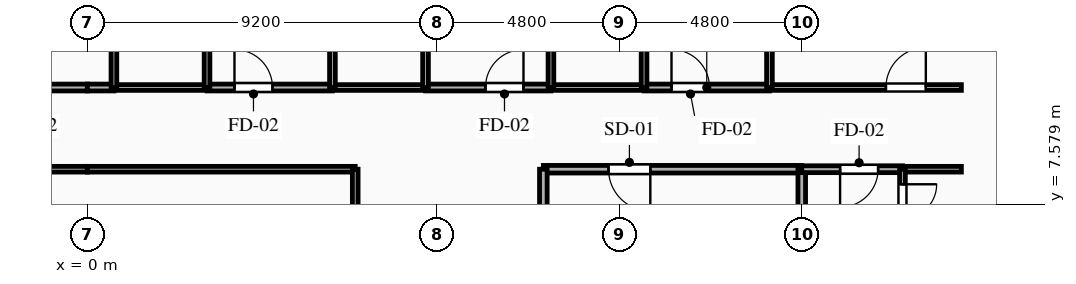
"""IFC4 building model, lengths in metres.
Left out: names, types, materials, properties, quantities, classifications, styles, units other than length and angle.
Written with IfcOpenShell. Run it as: python <this file> out.ifc"""

import sys

from ifc_helpers import new_model, si_unit, direction, frame, frame_2d, origin, place, context, subcontext, project, spatial, rectangle, extrude, element, fill, save


model = new_model("IFC4")
c1 = context("Model", 3, precision=1e-05, world=origin(), true_north=direction((0.0, 1.0)))
c2 = subcontext(c1, "Body", "Model", "MODEL_VIEW")
j1 = project(units=[si_unit("LENGTHUNIT", "METRE"), si_unit("PLANEANGLEUNIT", "RADIAN")], contexts=[c1])
p1 = place(None, origin())
s1 = spatial("IfcSite", under=j1, at=p1, CompositionType="ELEMENT")
p2 = place(p1, origin())
s2 = spatial("IfcBuilding", under=s1, at=p2, CompositionType="ELEMENT")
p3 = place(p2, frame((0.0, 0.0, 57.15)))
s3 = spatial("IfcBuildingStorey", under=s2, at=p3, CompositionType="ELEMENT", Elevation=57.15)
p4 = place(p3, frame((18.8, 8.5, 0.0), z_axis=(0.0, 0.0, 1.0), x_axis=(-1.0, 0.0, 0.0)))
e1 = element("IfcWall", 1, at=p4, inside=s3, PredefinedType="PARTITIONING", context=c2, shape_type="SweptSolid", body=[
    extrude(rectangle(XDim=6.8, YDim=0.2, at=frame_2d((3.4, 0.0))), origin(), (0.0, 0.0, 1.0), 3.035),
])
p5 = place(p4, frame((3.985, 0.0, 0.0)))
e2 = element("IfcOpeningElement", 2, at=p5, cuts=e1, PredefinedType="OPENING", context=c2, shape_type="SweptSolid", body=[
    extrude(rectangle(XDim=1.1, YDim=2.15, at=frame_2d((0.55, 1.075))), frame((0.0, 0.11, 0.0), z_axis=(0.0, -1.0, 0.0), x_axis=(1.0, 0.0, 0.0)), (0.0, 0.0, 1.0), 0.22),
])
p6 = place(p3, frame((12.0, 8.5, 0.0), z_axis=(0.0, 0.0, 1.0), x_axis=(0.0, -1.0, 0.0)))
e3 = element("IfcWall", 3, at=p6, inside=s3, PredefinedType="PARTITIONING", context=c2, shape_type="SweptSolid", body=[
    extrude(rectangle(XDim=2.9, YDim=0.2, at=frame_2d((1.45, 0.0))), origin(), (0.0, 0.0, 1.0), 3.035),
])
p7 = place(p3, frame((18.8, 5.6, 0.0), z_axis=(0.0, 0.0, 1.0), x_axis=(0.0, 1.0, 0.0)))
e4 = element("IfcWall", 4, at=p7, inside=s3, PredefinedType="PARTITIONING", context=c2, shape_type="SweptSolid", body=[
    extrude(rectangle(XDim=2.9, YDim=0.2, at=frame_2d((1.45, 0.0))), origin(), (0.0, 0.0, 1.0), 2.52),
])
p8 = place(p3, frame((-2.6, 10.65, 0.0), z_axis=(0.0, 0.0, 1.0), x_axis=(1.0, 0.0, 0.0)))
e5 = element("IfcWall", 5, at=p8, inside=s3, PredefinedType="PARTITIONING", context=c2, shape_type="SweptSolid", body=[
    extrude(rectangle(XDim=2.6, YDim=0.18, at=frame_2d((1.3, 0.0))), origin(), (0.0, 0.0, 1.0), 3.035),
])
p9 = place(p8, frame((0.635, 0.0, 0.0)))
e6 = element("IfcOpeningElement", 6, at=p9, cuts=e5, PredefinedType="OPENING", context=c2, shape_type="SweptSolid", body=[
    extrude(rectangle(XDim=1.0, YDim=2.15, at=frame_2d((0.5, 1.075))), frame((0.0, 0.1, 0.0), z_axis=(0.0, -1.0, 0.0), x_axis=(1.0, 0.0, 0.0)), (0.0, 0.0, 1.0), 0.2),
])
p10 = place(p3, frame((0.0, 8.5, 0.0), z_axis=(0.0, 0.0, 1.0), x_axis=(-1.0, 0.0, 0.0)))
e7 = element("IfcWall", 7, at=p10, inside=s3, PredefinedType="PARTITIONING", context=c2, shape_type="SweptSolid", body=[
    extrude(rectangle(XDim=7.05, YDim=0.15, at=frame_2d((3.525, 0.0))), origin(), (0.0, 0.0, 1.0), 3.035),
])
p11 = place(p10, frame((1.185, 0.0, 0.0)))
e8 = element("IfcOpeningElement", 8, at=p11, cuts=e7, PredefinedType="OPENING", context=c2, shape_type="SweptSolid", body=[
    extrude(rectangle(XDim=1.05, YDim=2.15, at=frame_2d((0.525, 1.075))), frame((0.0, 0.085, 0.0), z_axis=(0.0, -1.0, 0.0), x_axis=(1.0, 0.0, 0.0)), (0.0, 0.0, 1.0), 0.17),
])
p12 = place(p3, frame((21.45, 8.5, 0.0), z_axis=(0.0, 0.0, 1.0), x_axis=(-1.0, 0.0, 0.0)))
e9 = element("IfcWall", 9, at=p12, inside=s3, PredefinedType="PARTITIONING", context=c2, shape_type="SweptSolid", body=[
    extrude(rectangle(XDim=2.65, YDim=0.18, at=frame_2d((1.325, 0.0))), origin(), (0.0, 0.0, 1.0), 3.035),
])
p13 = place(p12, frame((0.641, 0.0, 0.0)))
e10 = element("IfcOpeningElement", 10, at=p13, cuts=e9, PredefinedType="OPENING", context=c2, shape_type="SweptSolid", body=[
    extrude(rectangle(XDim=1.0, YDim=2.15, at=frame_2d((0.5, 1.075))), frame((0.0, 0.1, 0.0), z_axis=(0.0, -1.0, 0.0), x_axis=(1.0, 0.0, 0.0)), (0.0, 0.0, 1.0), 0.2),
])
p14 = place(p3, frame((23.0, 8.5, 0.0), z_axis=(0.0, 0.0, 1.0), x_axis=(-1.0, 0.0, 0.0)))
e11 = element("IfcWall", 11, at=p14, inside=s3, PredefinedType="PARTITIONING", context=c2, shape_type="SweptSolid", body=[
    extrude(rectangle(XDim=1.55, YDim=0.15, at=frame_2d((0.775, 0.0))), origin(), (0.0, 0.0, 1.0), 3.035),
])
p15 = place(p3, frame((0.0, 10.65, 0.0), z_axis=(0.0, 0.0, 1.0), x_axis=(1.0, 0.0, 0.0)))
e12 = element("IfcWall", 12, at=p15, inside=s3, PredefinedType="PARTITIONING", context=c2, shape_type="SweptSolid", body=[
    extrude(rectangle(XDim=0.7, YDim=0.18, at=frame_2d((0.35, 0.0))), origin(), (0.0, 0.0, 1.0), 3.035),
])
p16 = place(p3, frame((3.15, 10.65, 0.0), z_axis=(0.0, 0.0, 1.0), x_axis=(1.0, 0.0, 0.0)))
e13 = element("IfcWall", 13, at=p16, inside=s3, PredefinedType="PARTITIONING", context=c2, shape_type="SweptSolid", body=[
    extrude(rectangle(XDim=3.3, YDim=0.18, at=frame_2d((1.65, 0.0))), origin(), (0.0, 0.0, 1.0), 3.035),
])
p17 = place(p16, frame((0.722, 0.0, 0.0)))
e14 = element("IfcOpeningElement", 14, at=p17, cuts=e13, PredefinedType="OPENING", context=c2, shape_type="SweptSolid", body=[
    extrude(rectangle(XDim=1.0, YDim=2.15, at=frame_2d((0.5, 1.075))), frame((0.0, 0.1, 0.0), z_axis=(0.0, -1.0, 0.0), x_axis=(1.0, 0.0, 0.0)), (0.0, 0.0, 1.0), 0.2),
])
p18 = place(p3, frame((0.7, 10.65, 0.0), z_axis=(0.0, 0.0, 1.0), x_axis=(1.0, 0.0, 0.0)))
e15 = element("IfcWall", 15, at=p18, inside=s3, PredefinedType="PLUMBINGWALL", context=c2, shape_type="SweptSolid", body=[
    extrude(rectangle(XDim=2.45, YDim=0.15, at=frame_2d((1.225, 0.0))), origin(), (0.0, 0.0, 1.0), 3.035),
])
p19 = place(p3, frame((8.9, 10.65, 0.0), z_axis=(0.0, 0.0, 1.0), x_axis=(1.0, 0.0, 0.0)))
e16 = element("IfcWall", 16, at=p19, inside=s3, PredefinedType="PARTITIONING", context=c2, shape_type="SweptSolid", body=[
    extrude(rectangle(XDim=3.3, YDim=0.18, at=frame_2d((1.65, 0.0))), origin(), (0.0, 0.0, 1.0), 3.035),
])
p20 = place(p19, frame((1.577, 0.0, 0.0)))
e17 = element("IfcOpeningElement", 17, at=p20, cuts=e16, PredefinedType="OPENING", context=c2, shape_type="SweptSolid", body=[
    extrude(rectangle(XDim=1.0, YDim=2.15, at=frame_2d((0.5, 1.075))), frame((0.0, 0.1, 0.0), z_axis=(0.0, -1.0, 0.0), x_axis=(1.0, 0.0, 0.0)), (0.0, 0.0, 1.0), 0.2),
])
p21 = place(p3, frame((6.45, 10.65, 0.0), z_axis=(0.0, 0.0, 1.0), x_axis=(1.0, 0.0, 0.0)))
e18 = element("IfcWall", 18, at=p21, inside=s3, PredefinedType="PLUMBINGWALL", context=c2, shape_type="SweptSolid", body=[
    extrude(rectangle(XDim=2.45, YDim=0.15, at=frame_2d((1.225, 0.0))), origin(), (0.0, 0.0, 1.0), 3.035),
])
p22 = place(p3, frame((14.65, 10.65, 0.0), z_axis=(0.0, 0.0, 1.0), x_axis=(1.0, 0.0, 0.0)))
e19 = element("IfcWall", 19, at=p22, inside=s3, PredefinedType="PARTITIONING", context=c2, shape_type="SweptSolid", body=[
    extrude(rectangle(XDim=3.3, YDim=0.18, at=frame_2d((1.65, 0.0))), origin(), (0.0, 0.0, 1.0), 3.035),
])
p23 = place(p22, frame((0.722, 0.0, 0.0)))
e20 = element("IfcOpeningElement", 20, at=p23, cuts=e19, PredefinedType="OPENING", context=c2, shape_type="SweptSolid", body=[
    extrude(rectangle(XDim=1.0, YDim=2.15, at=frame_2d((0.5, 1.075))), frame((0.0, 0.1, 0.0), z_axis=(0.0, -1.0, 0.0), x_axis=(1.0, 0.0, 0.0)), (0.0, 0.0, 1.0), 0.2),
])
p24 = place(p3, frame((12.2, 10.65, 0.0), z_axis=(0.0, 0.0, 1.0), x_axis=(1.0, 0.0, 0.0)))
e21 = element("IfcWall", 21, at=p24, inside=s3, PredefinedType="PLUMBINGWALL", context=c2, shape_type="SweptSolid", body=[
    extrude(rectangle(XDim=2.45, YDim=0.15, at=frame_2d((1.225, 0.0))), origin(), (0.0, 0.0, 1.0), 3.035),
])
p25 = place(p3, frame((17.95, 10.65, 0.0), z_axis=(0.0, 0.0, 1.0), x_axis=(1.0, 0.0, 0.0)))
e22 = element("IfcWall", 22, at=p25, inside=s3, PredefinedType="PARTITIONING", context=c2, shape_type="SweptSolid", body=[
    extrude(rectangle(XDim=5.05, YDim=0.15, at=frame_2d((2.525, 0.0))), origin(), (0.0, 0.0, 1.0), 3.035),
])
p26 = place(p25, frame((3.065, 0.0, 0.0)))
e23 = element("IfcOpeningElement", 23, at=p26, cuts=e22, PredefinedType="OPENING", context=c2, shape_type="SweptSolid", body=[
    extrude(rectangle(XDim=1.05, YDim=2.15, at=frame_2d((0.525, 1.075))), frame((0.0, 0.085, 0.0), z_axis=(0.0, -1.0, 0.0), x_axis=(1.0, 0.0, 0.0)), (0.0, 0.0, 1.0), 0.17),
])
for number, where, z_axis, x_axis in (
    (24, (7.05, 8.5, 0.0), (0.0, 0.0, 1.0), (-1.0, 0.0, 0.0)),
    (25, (7.05, 1.45, 0.0), (0.0, 0.0, 1.0), (0.0, 1.0, 0.0)),
):
    element("IfcWall", number, at=place(p3, frame(where, z_axis=z_axis, x_axis=x_axis)), inside=s3, PredefinedType="PARTITIONING", context=c2, shape_type="SweptSolid", body=[
        extrude(rectangle(XDim=7.05, YDim=0.15, at=frame_2d((3.525, 0.0))), origin(), (0.0, 0.0, 1.0), 3.035),
    ])
p27 = place(p3, frame((21.45, 8.5, 0.0), z_axis=(0.0, 0.0, 1.0), x_axis=(0.0, -1.0, 0.0)))
e26 = element("IfcWall", 26, at=p27, inside=s3, PredefinedType="PARTITIONING", context=c2, shape_type="SweptSolid", body=[
    extrude(rectangle(XDim=1.692, YDim=0.15, at=frame_2d((0.846, 0.0))), origin(), (0.0, 0.0, 1.0), 3.035),
])
p28 = place(p27, frame((0.396, 0.0, 0.0)))
e27 = element("IfcOpeningElement", 27, at=p28, cuts=e26, PredefinedType="OPENING", context=c2, shape_type="SweptSolid", body=[
    extrude(rectangle(XDim=0.9, YDim=2.1, at=frame_2d((0.45, 1.05))), frame((0.0, 0.085, 0.0), z_axis=(0.0, -1.0, 0.0), x_axis=(1.0, 0.0, 0.0)), (0.0, 0.0, 1.0), 0.17),
])
for number, where, z_axis, x_axis in (
    (28, (0.7, 12.8, 0.0), (0.0, 0.0, 1.0), (0.0, -1.0, 0.0)),
    (29, (3.15, 10.65, 0.0), (0.0, 0.0, 1.0), (0.0, 1.0, 0.0)),
    (30, (6.45, 12.8, 0.0), (0.0, 0.0, 1.0), (0.0, -1.0, 0.0)),
    (31, (8.9, 10.65, 0.0), (0.0, 0.0, 1.0), (0.0, 1.0, 0.0)),
    (32, (12.2, 12.8, 0.0), (0.0, 0.0, 1.0), (0.0, -1.0, 0.0)),
    (33, (14.65, 10.65, 0.0), (0.0, 0.0, 1.0), (0.0, 1.0, 0.0)),
):
    element("IfcWall", number, at=place(p3, frame(where, z_axis=z_axis, x_axis=x_axis)), inside=s3, PredefinedType="PLUMBINGWALL", context=c2, shape_type="SweptSolid", body=[
        extrude(rectangle(XDim=2.15, YDim=0.15, at=frame_2d((1.075, 0.0))), origin(), (0.0, 0.0, 1.0), 3.035),
    ])
p29 = place(p3, frame((17.95, 19.4, 0.0), z_axis=(0.0, 0.0, 1.0), x_axis=(0.0, -1.0, 0.0)))
e34 = element("IfcWall", 34, at=p29, inside=s3, PredefinedType="PARTITIONING", context=c2, shape_type="SweptSolid", body=[
    extrude(rectangle(XDim=8.75, YDim=0.15, at=frame_2d((4.375, 0.0))), origin(), (0.0, 0.0, 1.0), 3.035),
])
p30 = place(p5, origin())
e35 = element("IfcDoor", 35, at=p30, inside=s3, OperationType="SINGLE_SWING_LEFT", PredefinedType="DOOR", context=c2, shape_type="SweptSolid", body=[
    extrude(rectangle(XDim=1.1, YDim=2.15, at=frame_2d((0.55, 1.075))), frame((0.0, 0.025, 0.0), z_axis=(0.0, -1.0, 0.0), x_axis=(1.0, 0.0, 0.0)), (0.0, 0.0, 1.0), 0.05),
])
fill(e2, e35)
p31 = place(p13, origin())
e36 = element("IfcDoor", 36, at=p31, inside=s3, OperationType="SINGLE_SWING_RIGHT", PredefinedType="DOOR", context=c2, shape_type="SweptSolid", body=[
    extrude(rectangle(XDim=1.0, YDim=2.15, at=frame_2d((0.5, 1.075))), frame((0.0, 0.025, 0.0), z_axis=(0.0, -1.0, 0.0), x_axis=(1.0, 0.0, 0.0)), (0.0, 0.0, 1.0), 0.05),
])
fill(e10, e36)
p32 = place(p17, origin())
e37 = element("IfcDoor", 37, at=p32, inside=s3, OperationType="SINGLE_SWING_LEFT", PredefinedType="DOOR", context=c2, shape_type="SweptSolid", body=[
    extrude(rectangle(XDim=1.0, YDim=2.15, at=frame_2d((0.5, 1.075))), frame((0.0, 0.025, 0.0), z_axis=(0.0, -1.0, 0.0), x_axis=(1.0, 0.0, 0.0)), (0.0, 0.0, 1.0), 0.05),
])
fill(e14, e37)
p33 = place(p20, origin())
e38 = element("IfcDoor", 38, at=p33, inside=s3, OperationType="SINGLE_SWING_RIGHT", PredefinedType="DOOR", context=c2, shape_type="SweptSolid", body=[
    extrude(rectangle(XDim=1.0, YDim=2.15, at=frame_2d((0.5, 1.075))), frame((0.0, 0.025, 0.0), z_axis=(0.0, -1.0, 0.0), x_axis=(1.0, 0.0, 0.0)), (0.0, 0.0, 1.0), 0.05),
])
fill(e17, e38)
p34 = place(p23, origin())
e39 = element("IfcDoor", 39, at=p34, inside=s3, OperationType="SINGLE_SWING_LEFT", PredefinedType="DOOR", context=c2, shape_type="SweptSolid", body=[
    extrude(rectangle(XDim=1.0, YDim=2.15, at=frame_2d((0.5, 1.075))), frame((0.0, 0.025, 0.0), z_axis=(0.0, -1.0, 0.0), x_axis=(1.0, 0.0, 0.0)), (0.0, 0.0, 1.0), 0.05),
])
fill(e20, e39)
p35 = place(p26, origin())
e40 = element("IfcDoor", 40, at=p35, inside=s3, OperationType="SINGLE_SWING_RIGHT", PredefinedType="DOOR", context=c2, shape_type="SweptSolid", body=[
    extrude(rectangle(XDim=1.05, YDim=2.15, at=frame_2d((0.525, 1.075))), frame((0.0, 0.025, 0.0), z_axis=(0.0, -1.0, 0.0), x_axis=(1.0, 0.0, 0.0)), (0.0, 0.0, 1.0), 0.05),
])
fill(e23, e40)
p36 = place(p28, origin())
e41 = element("IfcDoor", 41, at=p36, inside=s3, OperationType="SINGLE_SWING_LEFT", PredefinedType="DOOR", context=c2, shape_type="SweptSolid", body=[
    extrude(rectangle(XDim=0.9, YDim=2.1, at=frame_2d((0.45, 1.05))), frame((0.0, 0.025, 0.0), z_axis=(0.0, -1.0, 0.0), x_axis=(1.0, 0.0, 0.0)), (0.0, 0.0, 1.0), 0.05),
])
fill(e27, e41)
save(model, sys.argv[1])
